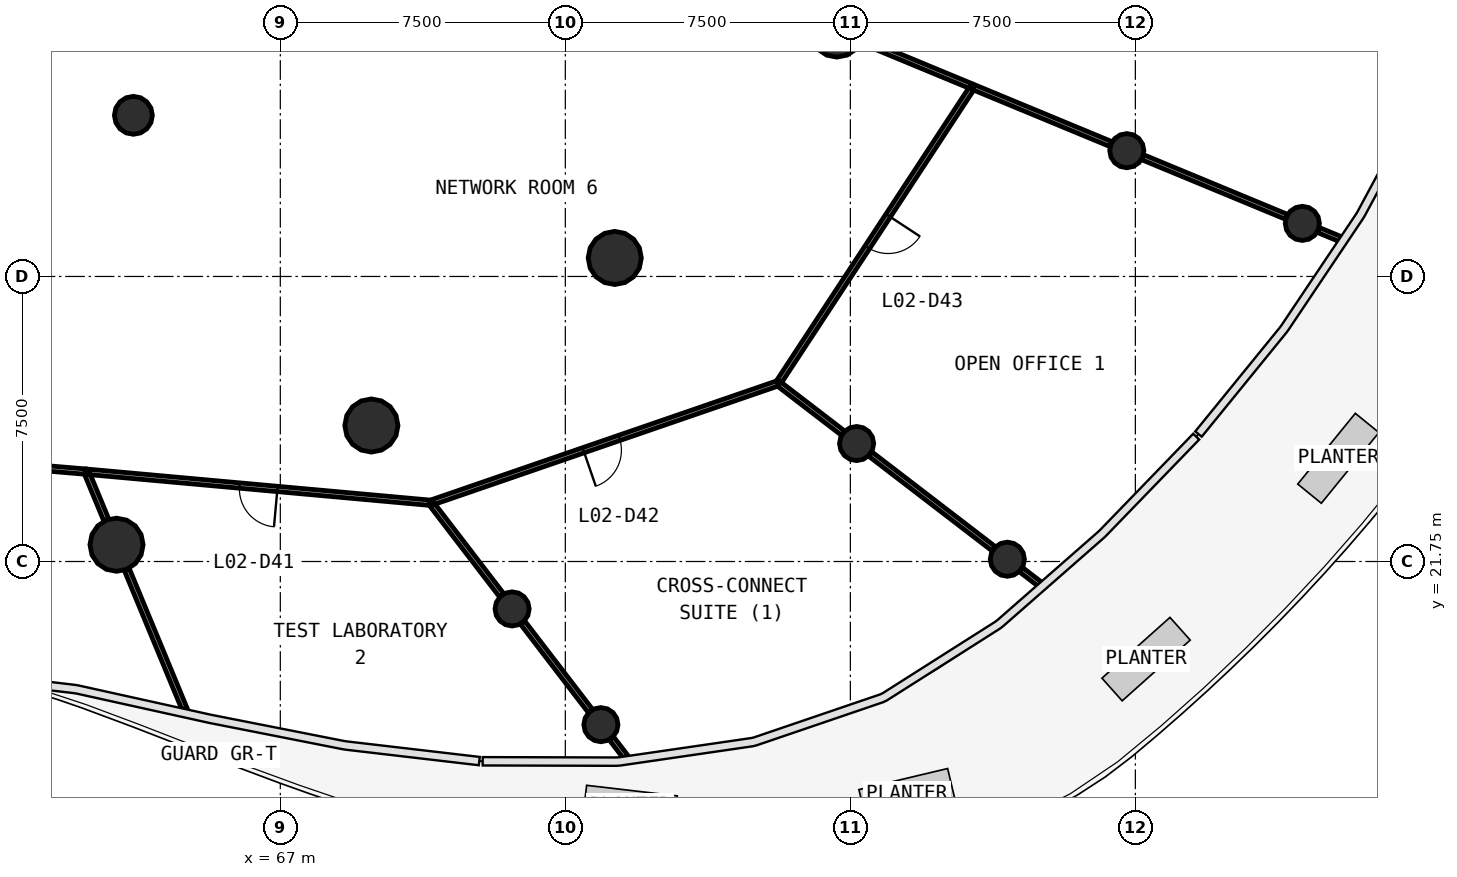
"""IFC4 building model, lengths in metres.
Left out: names, types, materials, properties, quantities, classifications, styles, units other than length and angle.
Written with IfcOpenShell. Run it as: python <this file> out.ifc"""

import sys

from ifc_helpers import new_model, si_unit, direction, frame, frame_2d, origin, origin_2d, place, context, subcontext, project, spatial, rectangle, circle, extrude, source, transform, mapped, element, fill, save


model = new_model("IFC4")
c1 = context("Model", 3, precision=1e-05, world=origin(), true_north=direction((0.0, 1.0)))
c2 = subcontext(c1, "Body", "Model", "MODEL_VIEW")
j1 = project(units=[si_unit("LENGTHUNIT", "METRE"), si_unit("PLANEANGLEUNIT", "RADIAN")], contexts=[c1])
p1 = place(None, origin())
s1 = spatial("IfcSite", under=j1, at=p1, CompositionType="ELEMENT")
p2 = place(p1, origin())
s2 = spatial("IfcBuilding", under=s1, at=p2, CompositionType="ELEMENT")
p3 = place(p2, frame((0.0, 0.0, 9.4)))
s3 = spatial("IfcBuildingStorey", under=s2, at=p3, CompositionType="ELEMENT", Elevation=9.4)
m1 = source(origin(), c2, "Body", "SweptSolid", [
    extrude(circle(Radius=0.7, at=origin_2d()), origin(), (0.0, 0.0, 1.0), 4.4),
])
for number, where, z_axis, x_axis in (
    (1, (62.69, 22.191, 0.0), (0.0, 0.0, 1.0), (1.0, 0.0, 0.0)),
    (2, (69.396, 25.328, 0.0), (0.0, 0.0, 1.0), (1.0, 0.0, 0.0)),
    (3, (75.801, 29.737, 0.0), (0.0, 0.0, 1.0), (1.0, 0.0, 0.0)),
    (4, (81.645, 35.721, 0.0), (0.0, 0.0, 1.0), (1.0, 0.0, 0.0)),
):
    element("IfcColumn", number, at=place(p3, frame(where, z_axis=z_axis, x_axis=x_axis)), inside=s3, PredefinedType="COLUMN", context=c2, shape_type="MappedRepresentation", body=[
        mapped(m1, transform((0.0, 0.0, 0.0), scale=1.0)),
    ])
m2 = source(origin(), c2, "Body", "SweptSolid", [
    extrude(circle(Radius=0.5, at=origin_2d()), origin(), (0.0, 0.0, 1.0), 4.4),
])
p4 = place(p3, frame((63.134, 33.49, 0.0), z_axis=(0.0, 0.0, 1.0), x_axis=(1.0, 0.0, 0.0)))
e5 = element("IfcColumn", 5, at=p4, inside=s3, PredefinedType="COLUMN", context=c2, shape_type="MappedRepresentation", body=[
    mapped(m2, transform((0.0, 0.0, 0.0), scale=1.0)),
])
m3 = source(origin(), c2, "Body", "SweptSolid", [
    extrude(circle(Radius=0.45, at=origin_2d()), origin(), (0.0, 0.0, 1.0), 3.95),
])
for number, where, z_axis, x_axis in (
    (6, (75.436, 17.457, 0.0), (0.0, 0.0, 1.0), (1.0, 0.0, 0.0)),
    (7, (86.131, 21.81, 0.0), (0.0, 0.0, 1.0), (1.0, 0.0, 0.0)),
    (8, (93.894, 30.647, 0.0), (0.0, 0.0, 1.0), (1.0, 0.0, 0.0)),
):
    element("IfcColumn", number, at=place(p3, frame(where, z_axis=z_axis, x_axis=x_axis)), inside=s3, PredefinedType="COLUMN", context=c2, shape_type="MappedRepresentation", body=[
        mapped(m3, transform((0.0, 0.0, 0.0), scale=1.0)),
    ])
m4 = source(origin(), c2, "Body", "SweptSolid", [
    extrude(circle(Radius=0.45, at=origin_2d()), origin(), (0.0, 0.0, 1.0), 4.4),
])
for number, where, z_axis, x_axis in (
    (9, (73.1, 20.503, 0.0), (0.0, 0.0, 1.0), (1.0, 0.0, 0.0)),
    (10, (82.165, 24.854, 0.0), (0.0, 0.0, 1.0), (1.0, 0.0, 0.0)),
    (11, (89.275, 32.56, 0.0), (0.0, 0.0, 1.0), (1.0, 0.0, 0.0)),
):
    element("IfcColumn", number, at=place(p3, frame(where, z_axis=z_axis, x_axis=x_axis)), inside=s3, PredefinedType="COLUMN", context=c2, shape_type="MappedRepresentation", body=[
        mapped(m4, transform((0.0, 0.0, 0.0), scale=1.0)),
    ])
p5 = place(p3, frame((80.097, 26.44, 0.0), z_axis=(0.0, 0.0, 1.0), x_axis=(-0.945541154245, -0.325502573922, 0.0)))
e12 = element("IfcWall", 12, at=p5, inside=s3, PredefinedType="PARTITIONING", context=c2, shape_type="SweptSolid", body=[
    extrude(rectangle(XDim=9.666, YDim=0.14, at=frame_2d((4.833, 0.0))), origin(), (0.0, 0.0, 1.0), 3.15),
])
p6 = place(p5, frame((4.416, 0.0, 0.0)))
e13 = element("IfcOpeningElement", 13, at=p6, cuts=e12, PredefinedType="OPENING", context=c2, shape_type="SweptSolid", body=[
    extrude(rectangle(XDim=1.0, YDim=2.1, at=frame_2d((0.5, 1.05))), frame((0.0, 0.08, 0.0), z_axis=(0.0, -1.0, 0.0), x_axis=(1.0, 0.0, 0.0)), (0.0, 0.0, 1.0), 0.16),
])
p7 = place(p3, frame((85.219, 34.24, 0.0), z_axis=(0.0, 0.0, 1.0), x_axis=(-0.548956837057, -0.835850699018, 0.0)))
e14 = element("IfcWall", 14, at=p7, inside=s3, PredefinedType="PARTITIONING", context=c2, shape_type="SweptSolid", body=[
    extrude(rectangle(XDim=9.301, YDim=0.14, at=frame_2d((4.651, 0.0))), origin(), (0.0, 0.0, 1.0), 3.15),
])
p8 = place(p7, frame((4.051, 0.0, 0.0)))
e15 = element("IfcOpeningElement", 15, at=p8, cuts=e14, PredefinedType="OPENING", context=c2, shape_type="SweptSolid", body=[
    extrude(rectangle(XDim=1.0, YDim=2.1, at=frame_2d((0.5, 1.05))), frame((0.0, 0.08, 0.0), z_axis=(0.0, -1.0, 0.0), x_axis=(1.0, 0.0, 0.0)), (0.0, 0.0, 1.0), 0.16),
])
p9 = place(p3, frame((70.927, 23.297, 0.0), z_axis=(0.0, 0.0, 1.0), x_axis=(-0.995938530205, 0.090035793182, 0.0)))
e16 = element("IfcWall", 16, at=p9, inside=s3, PredefinedType="PARTITIONING", context=c2, shape_type="SweptSolid", body=[
    extrude(rectangle(XDim=9.07, YDim=0.14, at=frame_2d((4.535, 0.0))), origin(), (0.0, 0.0, 1.0), 3.15),
])
p10 = place(p9, frame((4.021, 0.0, 0.0)))
e17 = element("IfcOpeningElement", 17, at=p10, cuts=e16, PredefinedType="OPENING", context=c2, shape_type="SweptSolid", body=[
    extrude(rectangle(XDim=1.0, YDim=2.1, at=frame_2d((0.5, 1.05))), frame((0.0, 0.08, 0.0), z_axis=(0.0, -1.0, 0.0), x_axis=(1.0, 0.0, 0.0)), (0.0, 0.0, 1.0), 0.16),
])
p11 = place(p3, frame((61.864, 24.116, 0.0), z_axis=(0.0, 0.0, 1.0), x_axis=(-0.996481261198, 0.083815846237, 0.0)))
e18 = element("IfcWall", 18, at=p11, inside=s3, PredefinedType="PARTITIONING", context=c2, shape_type="SweptSolid", body=[
    extrude(rectangle(XDim=6.819, YDim=0.14, at=frame_2d((3.409, 0.0))), origin(), (0.0, 0.0, 1.0), 3.15),
])
p12 = place(p11, frame((2.969, 0.0, 0.0)))
e19 = element("IfcOpeningElement", 19, at=p12, cuts=e18, PredefinedType="OPENING", context=c2, shape_type="SweptSolid", body=[
    extrude(rectangle(XDim=1.0, YDim=2.1, at=frame_2d((0.5, 1.05))), frame((0.0, 0.08, 0.0), z_axis=(0.0, -1.0, 0.0), x_axis=(1.0, 0.0, 0.0)), (0.0, 0.0, 1.0), 0.16),
])
p13 = place(p3, frame((82.525, 24.577, 0.0), z_axis=(0.0, 0.0, 1.0), x_axis=(0.793377694402, -0.608729688799, 0.0)))
e20 = element("IfcWall", 20, at=p13, inside=s3, PredefinedType="PARTITIONING", context=c2, shape_type="SweptSolid", body=[
    extrude(rectangle(XDim=4.091, YDim=0.14, at=frame_2d((2.045, 0.0))), origin(), (0.0, 0.0, 1.0), 3.15),
])
p14 = place(p3, frame((89.695, 32.386, 0.0), z_axis=(0.0, 0.0, 1.0), x_axis=(0.92386621601, -0.382715579661, 0.0)))
e21 = element("IfcWall", 21, at=p14, inside=s3, PredefinedType="PARTITIONING", context=c2, shape_type="SweptSolid", body=[
    extrude(rectangle(XDim=4.09, YDim=0.14, at=frame_2d((2.045, 0.0))), origin(), (0.0, 0.0, 1.0), 3.15),
])
p15 = place(p3, frame((62.96, 21.54, 0.0), z_axis=(0.0, 0.0, 1.0), x_axis=(0.382661550363, -0.92388859603, 0.0)))
e22 = element("IfcWall", 22, at=p15, inside=s3, PredefinedType="PARTITIONING", context=c2, shape_type="SweptSolid", body=[
    extrude(rectangle(XDim=3.968, YDim=0.14, at=frame_2d((1.984, 0.0))), origin(), (0.0, 0.0, 1.0), 3.15),
])
p16 = place(p3, frame((85.247, 34.229, 0.0), z_axis=(0.0, 0.0, 1.0), x_axis=(0.92387965154, -0.382683145003, 0.0)))
e23 = element("IfcWall", 23, at=p16, inside=s3, PredefinedType="PARTITIONING", context=c2, shape_type="SweptSolid", body=[
    extrude(rectangle(XDim=3.904, YDim=0.14, at=frame_2d((1.952, 0.0))), origin(), (0.0, 0.0, 1.0), 3.15),
])
p17 = place(p3, frame((82.296, 35.451, 0.0), z_axis=(0.0, 0.0, 1.0), x_axis=(0.923889850499, -0.382658521591, 0.0)))
e24 = element("IfcWall", 24, at=p17, inside=s3, PredefinedType="PARTITIONING", context=c2, shape_type="SweptSolid", body=[
    extrude(rectangle(XDim=3.093, YDim=0.14, at=frame_2d((1.546, 0.0))), origin(), (0.0, 0.0, 1.0), 3.15),
])
p18 = place(p3, frame((71.002, 23.236, 0.0), z_axis=(0.0, 0.0, 1.0), x_axis=(0.608806836057, -0.793318496173, 0.0)))
e25 = element("IfcWall", 25, at=p18, inside=s3, PredefinedType="PARTITIONING", context=c2, shape_type="SweptSolid", body=[
    extrude(rectangle(XDim=2.99, YDim=0.14, at=frame_2d((1.495, 0.0))), origin(), (0.0, 0.0, 1.0), 3.15),
])
p19 = place(p3, frame((73.376, 20.142, 0.0), z_axis=(0.0, 0.0, 1.0), x_axis=(0.608763898154, -0.793351445643, 0.0)))
e26 = element("IfcWall", 26, at=p19, inside=s3, PredefinedType="PARTITIONING", context=c2, shape_type="SweptSolid", body=[
    extrude(rectangle(XDim=2.93, YDim=0.14, at=frame_2d((1.465, 0.0))), origin(), (0.0, 0.0, 1.0), 3.15),
])
p20 = place(p3, frame((80.121, 26.422, 0.0), z_axis=(0.0, 0.0, 1.0), x_axis=(0.793337757309, -0.608781736609, 0.0)))
e27 = element("IfcWall", 27, at=p20, inside=s3, PredefinedType="PARTITIONING", context=c2, shape_type="SweptSolid", body=[
    extrude(rectangle(XDim=2.122, YDim=0.14, at=frame_2d((1.061, 0.0))), origin(), (0.0, 0.0, 1.0), 3.15),
])
p21 = place(p3, frame((61.924, 24.041, 0.0), z_axis=(0.0, 0.0, 1.0), x_axis=(0.382595690084, -0.923915871673, 0.0)))
e28 = element("IfcWall", 28, at=p21, inside=s3, PredefinedType="PARTITIONING", context=c2, shape_type="SweptSolid", body=[
    extrude(rectangle(XDim=1.297, YDim=0.14, at=frame_2d((0.648, 0.0))), origin(), (0.0, 0.0, 1.0), 3.15),
])
p22 = place(p3, frame((94.314, 30.473, 0.0), z_axis=(0.0, 0.0, 1.0), x_axis=(0.923861804277, -0.382726229306, 0.0)))
e29 = element("IfcWall", 29, at=p22, inside=s3, PredefinedType="PARTITIONING", context=c2, shape_type="SweptSolid", body=[
    extrude(rectangle(XDim=0.634, YDim=0.14, at=frame_2d((0.317, 0.0))), origin(), (0.0, 0.0, 1.0), 3.15),
])
p23 = place(p3, frame((86.492, 21.533, 0.0), z_axis=(0.0, 0.0, 1.0), x_axis=(0.793240017883, -0.608909085191, 0.0)))
e30 = element("IfcWall", 30, at=p23, inside=s3, PredefinedType="PARTITIONING", context=c2, shape_type="SweptSolid", body=[
    extrude(rectangle(XDim=0.633, YDim=0.14, at=frame_2d((0.316, 0.0))), origin(), (0.0, 0.0, 1.0), 3.15),
])
p24 = place(p3, frame((75.713, 17.097, 0.0), z_axis=(0.0, 0.0, 1.0), x_axis=(0.608865317956, -0.79327361269, 0.0)))
e31 = element("IfcWall", 31, at=p24, inside=s3, PredefinedType="PARTITIONING", context=c2, shape_type="SweptSolid", body=[
    extrude(rectangle(XDim=0.614, YDim=0.14, at=frame_2d((0.307, 0.0))), origin(), (0.0, 0.0, 1.0), 3.15),
])
m5 = source(origin(), c2, "Body", "SweptSolid", [
    extrude(rectangle(XDim=1.0, YDim=2.1, at=frame_2d((0.5, 1.05))), frame((0.0, 0.025, 0.0), z_axis=(0.0, -1.0, 0.0), x_axis=(1.0, 0.0, 0.0)), (0.0, 0.0, 1.0), 0.05),
])
p25 = place(p10, origin())
e32 = element("IfcDoor", 32, at=p25, inside=s3, OperationType="SINGLE_SWING_LEFT", PredefinedType="DOOR", context=c2, shape_type="MappedRepresentation", body=[
    mapped(m5, transform((0.0, 0.0, 0.0), scale=1.0)),
])
fill(e17, e32)
p26 = place(p6, origin())
e33 = element("IfcDoor", 33, at=p26, inside=s3, OperationType="SINGLE_SWING_RIGHT", PredefinedType="DOOR", context=c2, shape_type="MappedRepresentation", body=[
    mapped(m5, transform((0.0, 0.0, 0.0), scale=1.0)),
])
fill(e13, e33)
p27 = place(p8, origin())
e34 = element("IfcDoor", 34, at=p27, inside=s3, OperationType="SINGLE_SWING_LEFT", PredefinedType="DOOR", context=c2, shape_type="MappedRepresentation", body=[
    mapped(m5, transform((0.0, 0.0, 0.0), scale=1.0)),
])
fill(e15, e34)
save(model, sys.argv[1])
